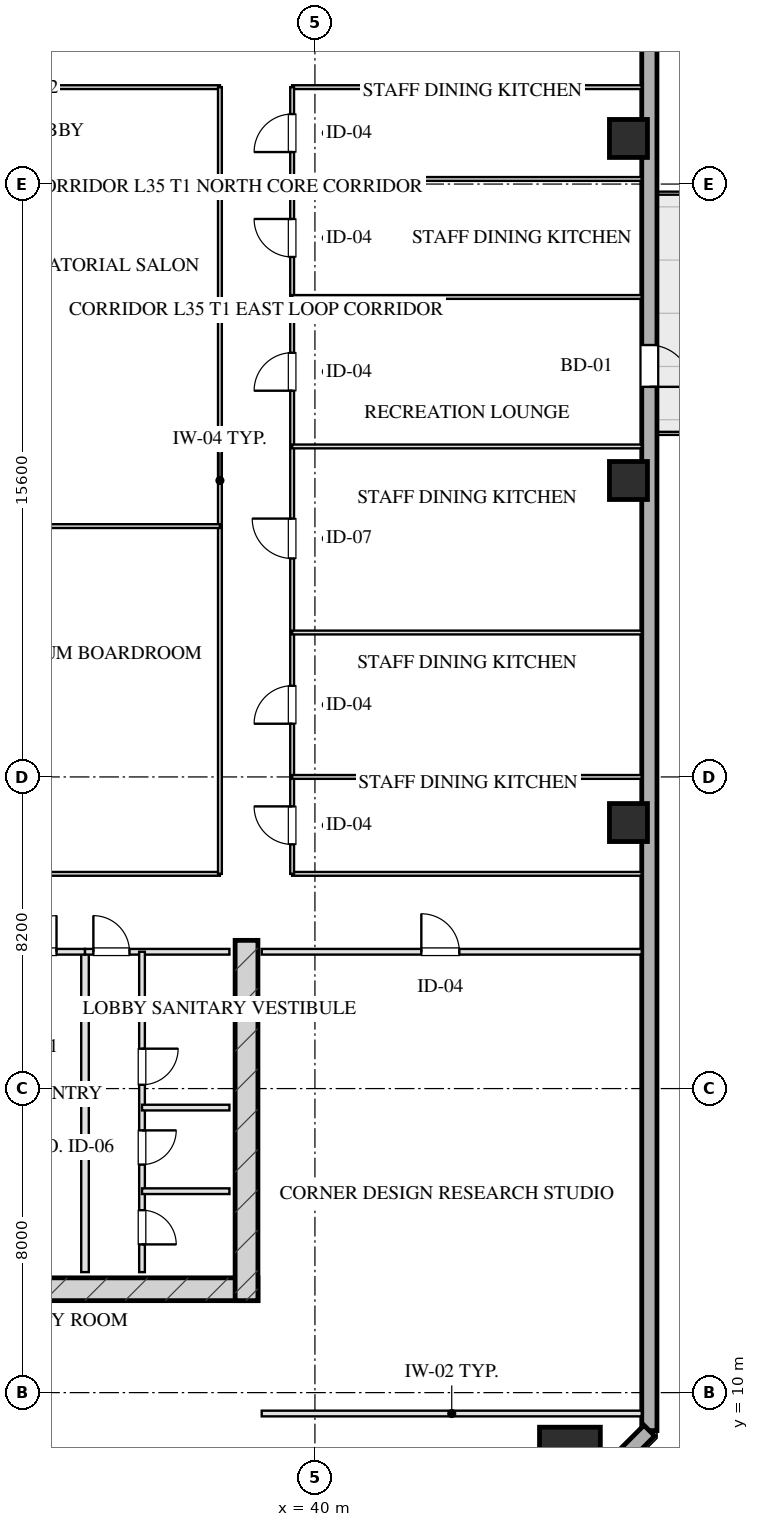
"""IFC4 building model, lengths in metres.
Left out: names, types, materials, properties, quantities, classifications, styles, units other than length and angle.
Written with IfcOpenShell. Run it as: python <this file> out.ifc"""

import sys

from ifc_helpers import new_model, si_unit, direction, frame, frame_2d, origin, origin_2d, place, context, subcontext, project, spatial, rectangle, hollow_rectangle, extrude, element, fill, save


model = new_model("IFC4")
c1 = context("Model", 3, precision=1e-05, world=origin(), true_north=direction((0.0, 1.0)))
c2 = subcontext(c1, "Body", "Model", "MODEL_VIEW")
j1 = project(units=[si_unit("LENGTHUNIT", "METRE"), si_unit("PLANEANGLEUNIT", "RADIAN")], contexts=[c1])
p1 = place(None, origin())
s1 = spatial("IfcSite", under=j1, at=p1, CompositionType="ELEMENT")
p2 = place(p1, origin())
s2 = spatial("IfcBuilding", under=s1, at=p2, CompositionType="ELEMENT")
p3 = place(p2, frame((0.0, 0.0, 134.55)))
s3 = spatial("IfcBuildingStorey", under=s2, at=p3, CompositionType="ELEMENT", Elevation=134.55)
p4 = place(p3, frame((21.5, 12.72, 0.0), z_axis=(0.0, 0.0, 1.0), x_axis=(1.0, 0.0, 0.0)))
e1 = element("IfcWall", 1, at=p4, inside=s3, PredefinedType="SHEAR", context=c2, shape_type="SweptSolid", body=[
    extrude(rectangle(XDim=17.0, YDim=0.6, at=frame_2d((8.5, 0.0))), origin(), (0.0, 0.0, 1.0), 3.45),
])
p5 = place(p3, frame((38.2, 21.9, 0.0), z_axis=(0.0, 0.0, 1.0), x_axis=(0.0, -1.0, 0.0)))
e2 = element("IfcWall", 2, at=p5, inside=s3, PredefinedType="SHEAR", context=c2, shape_type="SweptSolid", body=[
    extrude(rectangle(XDim=9.48, YDim=0.6, at=frame_2d((4.74, 0.0))), origin(), (0.0, 0.0, 1.0), 3.45),
])
p6 = place(p3, frame((46.71, 8.29, 0.0), z_axis=(0.0, 0.0, 1.0), x_axis=(1.0, 0.0, 0.0)))
e3 = element("IfcColumn", 3, at=p6, inside=s3, PredefinedType="COLUMN", context=c2, shape_type="SweptSolid", body=[
    extrude(hollow_rectangle(XDim=1.6, YDim=1.6, WallThickness=0.055, at=origin_2d()), origin(), (0.0, 0.0, 1.0), 3.451),
])
for number, where, z_axis, x_axis in (
    (4, (48.25, 25.0, 0.0), (0.0, 0.0, 1.0), (1.0, 0.0, 0.0)),
    (5, (48.25, 34.0, 0.0), (0.0, 0.0, 1.0), (1.0, 0.0, 0.0)),
    (6, (48.25, 43.0, 0.0), (0.0, 0.0, 1.0), (1.0, 0.0, 0.0)),
):
    element("IfcColumn", number, at=place(p3, frame(where, z_axis=z_axis, x_axis=x_axis)), inside=s3, PredefinedType="COLUMN", context=c2, shape_type="SweptSolid", body=[
        extrude(hollow_rectangle(XDim=1.0, YDim=1.0, WallThickness=0.036, at=origin_2d()), origin(), (0.0, 0.0, 1.0), 3.451),
    ])
p7 = place(p3, frame((48.8, 59.0, 0.0), z_axis=(0.0, 0.0, 1.0), x_axis=(0.0, -1.0, 0.0)))
e7 = element("IfcWall", 7, at=p7, inside=s3, PredefinedType="SOLIDWALL", context=c2, shape_type="SweptSolid", body=[
    extrude(rectangle(XDim=50.0, YDim=0.4, at=frame_2d((25.0, 0.0))), origin(), (0.0, 0.0, 1.0), 2.55),
])
p8 = place(p7, frame((21.436, 0.0, 0.0)))
e8 = element("IfcOpeningElement", 8, at=p8, cuts=e7, PredefinedType="OPENING", context=c2, shape_type="SweptSolid", body=[
    extrude(rectangle(XDim=1.1, YDim=2.15, at=frame_2d((0.55, 1.075))), frame((0.0, 0.21, 0.0), z_axis=(0.0, -1.0, 0.0), x_axis=(1.0, 0.0, 0.0)), (0.0, 0.0, 1.0), 0.42),
])
p9 = place(p3, frame((48.8, 9.0, 0.0), z_axis=(0.0, 0.0, 1.0), x_axis=(-0.707106781187, -0.707106781187, 0.0)))
e9 = element("IfcWall", 9, at=p9, inside=s3, PredefinedType="SOLIDWALL", context=c2, shape_type="SweptSolid", body=[
    extrude(rectangle(XDim=3.96, YDim=0.4, at=frame_2d((1.98, 0.0))), origin(), (0.0, 0.0, 1.0), 2.55),
])
p10 = place(p3, frame((33.95, 21.6, 0.0), z_axis=(0.0, 0.0, 1.0), x_axis=(0.0, -1.0, 0.0)))
e10 = element("IfcWall", 10, at=p10, inside=s3, PredefinedType="PARTITIONING", context=c2, shape_type="SweptSolid", body=[
    extrude(rectangle(XDim=8.43, YDim=0.2, at=frame_2d((4.215, 0.0))), origin(), (0.0, 0.0, 1.0), 3.155),
])
p11 = place(p3, frame((29.55, 21.6, 0.0), z_axis=(0.0, 0.0, 1.0), x_axis=(1.0, 0.0, 0.0)))
e11 = element("IfcWall", 11, at=p11, inside=s3, PredefinedType="PARTITIONING", context=c2, shape_type="SweptSolid", body=[
    extrude(rectangle(XDim=4.4, YDim=0.15, at=frame_2d((2.2, 0.0))), origin(), (0.0, 0.0, 1.0), 3.155),
])
p12 = place(p11, frame((0.55, 0.0, 0.0)))
e12 = element("IfcOpeningElement", 12, at=p12, cuts=e11, PredefinedType="OPENING", context=c2, shape_type="SweptSolid", body=[
    extrude(rectangle(XDim=0.95, YDim=2.05, at=frame_2d((0.475, 1.025))), frame((0.0, 0.085, 0.0), z_axis=(0.0, -1.0, 0.0), x_axis=(1.0, 0.0, 0.0)), (0.0, 0.0, 1.0), 0.17),
])
p13 = place(p11, frame((2.7, 0.0, 0.0)))
e13 = element("IfcOpeningElement", 13, at=p13, cuts=e11, PredefinedType="OPENING", context=c2, shape_type="SweptSolid", body=[
    extrude(rectangle(XDim=0.95, YDim=2.05, at=frame_2d((0.475, 1.025))), frame((0.0, 0.085, 0.0), z_axis=(0.0, -1.0, 0.0), x_axis=(1.0, 0.0, 0.0)), (0.0, 0.0, 1.0), 0.17),
])
p14 = place(p3, frame((33.95, 21.6, 0.0), z_axis=(0.0, 0.0, 1.0), x_axis=(1.0, 0.0, 0.0)))
e14 = element("IfcWall", 14, at=p14, inside=s3, PredefinedType="PARTITIONING", context=c2, shape_type="SweptSolid", body=[
    extrude(rectangle(XDim=3.8, YDim=0.15, at=frame_2d((1.9, 0.0))), origin(), (0.0, 0.0, 1.0), 3.155),
])
p15 = place(p14, frame((0.22, 0.0, 0.0)))
e15 = element("IfcOpeningElement", 15, at=p15, cuts=e14, PredefinedType="OPENING", context=c2, shape_type="SweptSolid", body=[
    extrude(rectangle(XDim=0.95, YDim=2.05, at=frame_2d((0.475, 1.025))), frame((0.0, 0.085, 0.0), z_axis=(0.0, -1.0, 0.0), x_axis=(1.0, 0.0, 0.0)), (0.0, 0.0, 1.0), 0.17),
])
p16 = place(p3, frame((35.45, 21.6, 0.0), z_axis=(0.0, 0.0, 1.0), x_axis=(0.0, -1.0, 0.0)))
e16 = element("IfcWall", 16, at=p16, inside=s3, PredefinedType="PARTITIONING", context=c2, shape_type="SweptSolid", body=[
    extrude(rectangle(XDim=8.43, YDim=0.15, at=frame_2d((4.215, 0.0))), origin(), (0.0, 0.0, 1.0), 2.795),
])
p17 = place(p16, frame((2.55, 0.0, 0.0)))
e17 = element("IfcOpeningElement", 17, at=p17, cuts=e16, PredefinedType="OPENING", context=c2, shape_type="SweptSolid", body=[
    extrude(rectangle(XDim=0.95, YDim=2.05, at=frame_2d((0.475, 1.025))), frame((0.0, 0.085, 0.0), z_axis=(0.0, -1.0, 0.0), x_axis=(1.0, 0.0, 0.0)), (0.0, 0.0, 1.0), 0.17),
])
p18 = place(p16, frame((4.7, 0.0, 0.0)))
e18 = element("IfcOpeningElement", 18, at=p18, cuts=e16, PredefinedType="OPENING", context=c2, shape_type="SweptSolid", body=[
    extrude(rectangle(XDim=0.9, YDim=2.05, at=frame_2d((0.45, 1.025))), frame((0.0, 0.085, 0.0), z_axis=(0.0, -1.0, 0.0), x_axis=(1.0, 0.0, 0.0)), (0.0, 0.0, 1.0), 0.17),
])
p19 = place(p16, frame((6.8, 0.0, 0.0)))
e19 = element("IfcOpeningElement", 19, at=p19, cuts=e16, PredefinedType="OPENING", context=c2, shape_type="SweptSolid", body=[
    extrude(rectangle(XDim=0.9, YDim=2.05, at=frame_2d((0.45, 1.025))), frame((0.0, 0.085, 0.0), z_axis=(0.0, -1.0, 0.0), x_axis=(1.0, 0.0, 0.0)), (0.0, 0.0, 1.0), 0.17),
])
for number, where, z_axis, x_axis in (
    (20, (35.45, 17.5, 0.0), (0.0, 0.0, 1.0), (1.0, 0.0, 0.0)),
    (21, (35.45, 15.3, 0.0), (0.0, 0.0, 1.0), (1.0, 0.0, 0.0)),
):
    element("IfcWall", number, at=place(p3, frame(where, z_axis=z_axis, x_axis=x_axis)), inside=s3, PredefinedType="PARTITIONING", context=c2, shape_type="SweptSolid", body=[
        extrude(rectangle(XDim=2.3, YDim=0.15, at=frame_2d((1.15, 0.0))), origin(), (0.0, 0.0, 1.0), 3.155),
    ])
p20 = place(p3, frame((38.6, 9.45, 0.0), z_axis=(0.0, 0.0, 1.0), x_axis=(1.0, 0.0, 0.0)))
e22 = element("IfcWall", 22, at=p20, inside=s3, PredefinedType="PARTITIONING", context=c2, shape_type="SweptSolid", body=[
    extrude(rectangle(XDim=10.0, YDim=0.15, at=frame_2d((5.0, 0.0))), origin(), (0.0, 0.0, 1.0), 3.155),
])
p21 = place(p3, frame((38.6, 21.6, 0.0), z_axis=(0.0, 0.0, 1.0), x_axis=(1.0, 0.0, 0.0)))
e23 = element("IfcWall", 23, at=p21, inside=s3, PredefinedType="PARTITIONING", context=c2, shape_type="SweptSolid", body=[
    extrude(rectangle(XDim=10.0, YDim=0.15, at=frame_2d((5.0, 0.0))), origin(), (0.0, 0.0, 1.0), 3.155),
])
p22 = place(p21, frame((4.2, 0.0, 0.0)))
e24 = element("IfcOpeningElement", 24, at=p22, cuts=e23, PredefinedType="OPENING", context=c2, shape_type="SweptSolid", body=[
    extrude(rectangle(XDim=1.0, YDim=2.05, at=frame_2d((0.5, 1.025))), frame((0.0, 0.085, 0.0), z_axis=(0.0, -1.0, 0.0), x_axis=(1.0, 0.0, 0.0)), (0.0, 0.0, 1.0), 0.17),
])
p23 = place(p3, frame((28.3, 23.65, 0.0), z_axis=(0.0, 0.0, 1.0), x_axis=(1.0, 0.0, 0.0)))
e25 = element("IfcWall", 25, at=p23, inside=s3, PredefinedType="MOVABLE", context=c2, shape_type="SweptSolid", body=[
    extrude(rectangle(XDim=9.2, YDim=0.1, at=frame_2d((4.6, 0.0))), origin(), (0.0, 0.0, 1.0), 3.155),
])
p24 = place(p3, frame((39.4, 23.65, 0.0), z_axis=(0.0, 0.0, 1.0), x_axis=(1.0, 0.0, 0.0)))
e26 = element("IfcWall", 26, at=p24, inside=s3, PredefinedType="MOVABLE", context=c2, shape_type="SweptSolid", body=[
    extrude(rectangle(XDim=9.2, YDim=0.1, at=frame_2d((4.6, 0.0))), origin(), (0.0, 0.0, 1.0), 3.155),
])
p25 = place(p3, frame((28.3, 44.35, 0.0), z_axis=(0.0, 0.0, 1.0), x_axis=(1.0, 0.0, 0.0)))
e27 = element("IfcWall", 27, at=p25, inside=s3, PredefinedType="MOVABLE", context=c2, shape_type="SweptSolid", body=[
    extrude(rectangle(XDim=9.2, YDim=0.1, at=frame_2d((4.6, 0.0))), origin(), (0.0, 0.0, 1.0), 3.155),
])
p26 = place(p3, frame((39.4, 44.35, 0.0), z_axis=(0.0, 0.0, 1.0), x_axis=(1.0, 0.0, 0.0)))
e28 = element("IfcWall", 28, at=p26, inside=s3, PredefinedType="MOVABLE", context=c2, shape_type="SweptSolid", body=[
    extrude(rectangle(XDim=9.2, YDim=0.1, at=frame_2d((4.6, 0.0))), origin(), (0.0, 0.0, 1.0), 3.155),
])
p27 = place(p3, frame((37.5, 23.65, 0.0), z_axis=(0.0, 0.0, 1.0), x_axis=(0.0, 1.0, 0.0)))
e29 = element("IfcWall", 29, at=p27, inside=s3, PredefinedType="MOVABLE", context=c2, shape_type="SweptSolid", body=[
    extrude(rectangle(XDim=20.7, YDim=0.1, at=frame_2d((10.35, 0.0))), origin(), (0.0, 0.0, 1.0), 3.155),
])
p28 = place(p3, frame((39.4, 23.65, 0.0), z_axis=(0.0, 0.0, 1.0), x_axis=(0.0, 1.0, 0.0)))
e30 = element("IfcWall", 30, at=p28, inside=s3, PredefinedType="MOVABLE", context=c2, shape_type="SweptSolid", body=[
    extrude(rectangle(XDim=20.7, YDim=0.1, at=frame_2d((10.35, 0.0))), origin(), (0.0, 0.0, 1.0), 3.155),
])
p29 = place(p28, frame((0.775, 0.0, 0.0)))
e31 = element("IfcOpeningElement", 31, at=p29, cuts=e30, PredefinedType="OPENING", context=c2, shape_type="SweptSolid", body=[
    extrude(rectangle(XDim=1.0, YDim=2.05, at=frame_2d((0.5, 1.025))), frame((0.0, 0.06, 0.0), z_axis=(0.0, -1.0, 0.0), x_axis=(1.0, 0.0, 0.0)), (0.0, 0.0, 1.0), 0.12),
])
p30 = place(p28, frame((3.95, 0.0, 0.0)))
e32 = element("IfcOpeningElement", 32, at=p30, cuts=e30, PredefinedType="OPENING", context=c2, shape_type="SweptSolid", body=[
    extrude(rectangle(XDim=1.0, YDim=2.05, at=frame_2d((0.5, 1.025))), frame((0.0, 0.06, 0.0), z_axis=(0.0, -1.0, 0.0), x_axis=(1.0, 0.0, 0.0)), (0.0, 0.0, 1.0), 0.12),
])
p31 = place(p28, frame((8.298, 0.0, 0.0)))
e33 = element("IfcOpeningElement", 33, at=p31, cuts=e30, PredefinedType="OPENING", context=c2, shape_type="SweptSolid", body=[
    extrude(rectangle(XDim=1.05, YDim=2.05, at=frame_2d((0.525, 1.025))), frame((0.0, 0.06, 0.0), z_axis=(0.0, -1.0, 0.0), x_axis=(1.0, 0.0, 0.0)), (0.0, 0.0, 1.0), 0.12),
])
p32 = place(p28, frame((12.712, 0.0, 0.0)))
e34 = element("IfcOpeningElement", 34, at=p32, cuts=e30, PredefinedType="OPENING", context=c2, shape_type="SweptSolid", body=[
    extrude(rectangle(XDim=1.0, YDim=2.05, at=frame_2d((0.5, 1.025))), frame((0.0, 0.06, 0.0), z_axis=(0.0, -1.0, 0.0), x_axis=(1.0, 0.0, 0.0)), (0.0, 0.0, 1.0), 0.12),
])
p33 = place(p28, frame((16.231, 0.0, 0.0)))
e35 = element("IfcOpeningElement", 35, at=p33, cuts=e30, PredefinedType="OPENING", context=c2, shape_type="SweptSolid", body=[
    extrude(rectangle(XDim=1.0, YDim=2.05, at=frame_2d((0.5, 1.025))), frame((0.0, 0.06, 0.0), z_axis=(0.0, -1.0, 0.0), x_axis=(1.0, 0.0, 0.0)), (0.0, 0.0, 1.0), 0.12),
])
p34 = place(p28, frame((18.992, 0.0, 0.0)))
e36 = element("IfcOpeningElement", 36, at=p34, cuts=e30, PredefinedType="OPENING", context=c2, shape_type="SweptSolid", body=[
    extrude(rectangle(XDim=1.0, YDim=2.05, at=frame_2d((0.5, 1.025))), frame((0.0, 0.06, 0.0), z_axis=(0.0, -1.0, 0.0), x_axis=(1.0, 0.0, 0.0)), (0.0, 0.0, 1.0), 0.12),
])
p35 = place(p3, frame((28.3, 32.8, 0.0), z_axis=(0.0, 0.0, 1.0), x_axis=(1.0, 0.0, 0.0)))
e37 = element("IfcWall", 37, at=p35, inside=s3, PredefinedType="MOVABLE", context=c2, shape_type="SweptSolid", body=[
    extrude(rectangle(XDim=9.2, YDim=0.1, at=frame_2d((4.6, 0.0))), origin(), (0.0, 0.0, 1.0), 3.155),
])
for number, where, z_axis, x_axis in (
    (38, (39.4, 26.2, 0.0), (0.0, 0.0, 1.0), (1.0, 0.0, 0.0)),
    (39, (39.4, 30.0, 0.0), (0.0, 0.0, 1.0), (1.0, 0.0, 0.0)),
    (40, (39.4, 34.896, 0.0), (0.0, 0.0, 1.0), (1.0, 0.0, 0.0)),
    (41, (39.4, 38.829, 0.0), (0.0, 0.0, 1.0), (1.0, 0.0, 0.0)),
    (42, (39.4, 41.934, 0.0), (0.0, 0.0, 1.0), (1.0, 0.0, 0.0)),
):
    element("IfcWall", number, at=place(p3, frame(where, z_axis=z_axis, x_axis=x_axis)), inside=s3, PredefinedType="MOVABLE", context=c2, shape_type="SweptSolid", body=[
        extrude(rectangle(XDim=9.2, YDim=0.1, at=frame_2d((4.6, 0.0))), origin(), (0.0, 0.0, 1.0), 3.155),
    ])
p36 = place(p8, origin())
e43 = element("IfcDoor", 43, at=p36, inside=s3, OperationType="SINGLE_SWING_RIGHT", PredefinedType="DOOR", context=c2, shape_type="SweptSolid", body=[
    extrude(rectangle(XDim=1.1, YDim=2.15, at=frame_2d((0.55, 1.075))), frame((0.0, 0.025, 0.0), z_axis=(0.0, -1.0, 0.0), x_axis=(1.0, 0.0, 0.0)), (0.0, 0.0, 1.0), 0.05),
])
fill(e8, e43)
p37 = place(p13, origin())
e44 = element("IfcDoor", 44, at=p37, inside=s3, OperationType="SINGLE_SWING_RIGHT", PredefinedType="DOOR", context=c2, shape_type="SweptSolid", body=[
    extrude(rectangle(XDim=0.95, YDim=2.05, at=frame_2d((0.475, 1.025))), frame((0.0, 0.025, 0.0), z_axis=(0.0, -1.0, 0.0), x_axis=(1.0, 0.0, 0.0)), (0.0, 0.0, 1.0), 0.05),
])
fill(e13, e44)
p38 = place(p15, origin())
e45 = element("IfcDoor", 45, at=p38, inside=s3, OperationType="SINGLE_SWING_LEFT", PredefinedType="DOOR", context=c2, shape_type="SweptSolid", body=[
    extrude(rectangle(XDim=0.95, YDim=2.05, at=frame_2d((0.475, 1.025))), frame((0.0, 0.025, 0.0), z_axis=(0.0, -1.0, 0.0), x_axis=(1.0, 0.0, 0.0)), (0.0, 0.0, 1.0), 0.05),
])
fill(e15, e45)
p39 = place(p17, origin())
e46 = element("IfcDoor", 46, at=p39, inside=s3, OperationType="SINGLE_SWING_LEFT", PredefinedType="DOOR", context=c2, shape_type="SweptSolid", body=[
    extrude(rectangle(XDim=0.95, YDim=2.05, at=frame_2d((0.475, 1.025))), frame((0.0, 0.025, 0.0), z_axis=(0.0, -1.0, 0.0), x_axis=(1.0, 0.0, 0.0)), (0.0, 0.0, 1.0), 0.05),
])
fill(e17, e46)
p40 = place(p18, origin())
e47 = element("IfcDoor", 47, at=p40, inside=s3, OperationType="SINGLE_SWING_LEFT", PredefinedType="DOOR", context=c2, shape_type="SweptSolid", body=[
    extrude(rectangle(XDim=0.9, YDim=2.05, at=frame_2d((0.45, 1.025))), frame((0.0, 0.025, 0.0), z_axis=(0.0, -1.0, 0.0), x_axis=(1.0, 0.0, 0.0)), (0.0, 0.0, 1.0), 0.05),
])
fill(e18, e47)
p41 = place(p19, origin())
e48 = element("IfcDoor", 48, at=p41, inside=s3, OperationType="SINGLE_SWING_RIGHT", PredefinedType="DOOR", context=c2, shape_type="SweptSolid", body=[
    extrude(rectangle(XDim=0.9, YDim=2.05, at=frame_2d((0.45, 1.025))), frame((0.0, 0.025, 0.0), z_axis=(0.0, -1.0, 0.0), x_axis=(1.0, 0.0, 0.0)), (0.0, 0.0, 1.0), 0.05),
])
fill(e19, e48)
p42 = place(p22, origin())
e49 = element("IfcDoor", 49, at=p42, inside=s3, OperationType="SINGLE_SWING_LEFT", PredefinedType="DOOR", context=c2, shape_type="SweptSolid", body=[
    extrude(rectangle(XDim=1.0, YDim=2.05, at=frame_2d((0.5, 1.025))), frame((0.0, 0.025, 0.0), z_axis=(0.0, -1.0, 0.0), x_axis=(1.0, 0.0, 0.0)), (0.0, 0.0, 1.0), 0.05),
])
fill(e24, e49)
p43 = place(p29, origin())
e50 = element("IfcDoor", 50, at=p43, inside=s3, OperationType="SINGLE_SWING_RIGHT", PredefinedType="DOOR", context=c2, shape_type="SweptSolid", body=[
    extrude(rectangle(XDim=1.0, YDim=2.05, at=frame_2d((0.5, 1.025))), frame((0.0, 0.025, 0.0), z_axis=(0.0, -1.0, 0.0), x_axis=(1.0, 0.0, 0.0)), (0.0, 0.0, 1.0), 0.05),
])
fill(e31, e50)
p44 = place(p30, origin())
e51 = element("IfcDoor", 51, at=p44, inside=s3, OperationType="SINGLE_SWING_LEFT", PredefinedType="DOOR", context=c2, shape_type="SweptSolid", body=[
    extrude(rectangle(XDim=1.0, YDim=2.05, at=frame_2d((0.5, 1.025))), frame((0.0, 0.025, 0.0), z_axis=(0.0, -1.0, 0.0), x_axis=(1.0, 0.0, 0.0)), (0.0, 0.0, 1.0), 0.05),
])
fill(e32, e51)
p45 = place(p31, origin())
e52 = element("IfcDoor", 52, at=p45, inside=s3, OperationType="SINGLE_SWING_RIGHT", PredefinedType="DOOR", context=c2, shape_type="SweptSolid", body=[
    extrude(rectangle(XDim=1.05, YDim=2.05, at=frame_2d((0.525, 1.025))), frame((0.0, 0.025, 0.0), z_axis=(0.0, -1.0, 0.0), x_axis=(1.0, 0.0, 0.0)), (0.0, 0.0, 1.0), 0.05),
])
fill(e33, e52)
p46 = place(p32, origin())
e53 = element("IfcDoor", 53, at=p46, inside=s3, OperationType="SINGLE_SWING_LEFT", PredefinedType="DOOR", context=c2, shape_type="SweptSolid", body=[
    extrude(rectangle(XDim=1.0, YDim=2.05, at=frame_2d((0.5, 1.025))), frame((0.0, 0.025, 0.0), z_axis=(0.0, -1.0, 0.0), x_axis=(1.0, 0.0, 0.0)), (0.0, 0.0, 1.0), 0.05),
])
fill(e34, e53)
p47 = place(p33, origin())
e54 = element("IfcDoor", 54, at=p47, inside=s3, OperationType="SINGLE_SWING_RIGHT", PredefinedType="DOOR", context=c2, shape_type="SweptSolid", body=[
    extrude(rectangle(XDim=1.0, YDim=2.05, at=frame_2d((0.5, 1.025))), frame((0.0, 0.025, 0.0), z_axis=(0.0, -1.0, 0.0), x_axis=(1.0, 0.0, 0.0)), (0.0, 0.0, 1.0), 0.05),
])
fill(e35, e54)
p48 = place(p34, origin())
e55 = element("IfcDoor", 55, at=p48, inside=s3, OperationType="SINGLE_SWING_LEFT", PredefinedType="DOOR", context=c2, shape_type="SweptSolid", body=[
    extrude(rectangle(XDim=1.0, YDim=2.05, at=frame_2d((0.5, 1.025))), frame((0.0, 0.025, 0.0), z_axis=(0.0, -1.0, 0.0), x_axis=(1.0, 0.0, 0.0)), (0.0, 0.0, 1.0), 0.05),
])
fill(e36, e55)
save(model, sys.argv[1])
